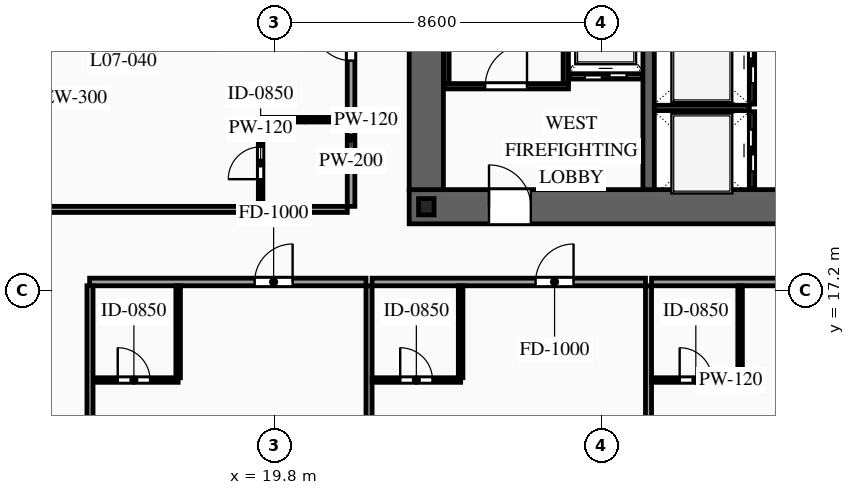
"""IFC4 building model, lengths in metres.
Left out: names, types, materials, properties, quantities, classifications, styles, units other than length and angle.
Written with IfcOpenShell. Run it as: python <this file> out.ifc"""

import sys

from ifc_helpers import new_model, si_unit, direction, frame, frame_2d, origin, origin_2d, place, context, subcontext, project, spatial, rectangle, i_section, extrude, source, transform, mapped, element, fill, save


model = new_model("IFC4")
c1 = context("Model", 3, precision=1e-05, world=origin(), true_north=direction((0.0, 1.0)))
c2 = subcontext(c1, "Body", "Model", "MODEL_VIEW")
j1 = project(units=[si_unit("LENGTHUNIT", "METRE"), si_unit("PLANEANGLEUNIT", "RADIAN")], contexts=[c1])
p1 = place(None, origin())
s1 = spatial("IfcSite", under=j1, at=p1, CompositionType="ELEMENT")
p2 = place(p1, origin())
s2 = spatial("IfcBuilding", under=s1, at=p2, CompositionType="ELEMENT")
p3 = place(p2, frame((0.0, 0.0, 30.6)))
s3 = spatial("IfcBuildingStorey", under=s2, at=p3, CompositionType="ELEMENT", Elevation=30.6)
p4 = place(p3, frame((23.35, 19.4, 0.0), z_axis=(0.0, 0.0, 1.0), x_axis=(1.0, 0.0, 0.0)))
e1 = element("IfcWall", 1, at=p4, inside=s3, PredefinedType="SHEAR", context=c2, shape_type="SweptSolid", body=[
    extrude(rectangle(XDim=27.3, YDim=0.9, at=frame_2d((13.65, 0.0))), origin(), (0.0, 0.0, 1.0), 3.6),
])
p5 = place(p4, frame((2.1, 0.0, 0.0)))
e2 = element("IfcOpeningElement", 2, at=p5, cuts=e1, PredefinedType="OPENING", context=c2, shape_type="SweptSolid", body=[
    extrude(rectangle(XDim=1.1, YDim=2.2, at=frame_2d((0.55, 1.1))), frame((0.0, 0.465, 0.0), z_axis=(0.0, -1.0, 0.0), x_axis=(1.0, 0.0, 0.0)), (0.0, 0.0, 1.0), 0.93),
])
p6 = place(p4, frame((10.0, 0.0, 0.0)))
e3 = element("IfcOpeningElement", 3, at=p6, cuts=e1, PredefinedType="OPENING", context=c2, shape_type="SweptSolid", body=[
    extrude(rectangle(XDim=1.1, YDim=2.2, at=frame_2d((0.55, 1.1))), frame((0.0, 0.465, 0.0), z_axis=(0.0, -1.0, 0.0), x_axis=(1.0, 0.0, 0.0)), (0.0, 0.0, 1.0), 0.93),
])
p7 = place(p4, frame((23.2, 0.0, 0.0)))
e4 = element("IfcOpeningElement", 4, at=p7, cuts=e1, PredefinedType="OPENING", context=c2, shape_type="SweptSolid", body=[
    extrude(rectangle(XDim=1.1, YDim=2.2, at=frame_2d((0.55, 1.1))), frame((0.0, 0.465, 0.0), z_axis=(0.0, -1.0, 0.0), x_axis=(1.0, 0.0, 0.0)), (0.0, 0.0, 1.0), 0.93),
])
p8 = place(p4, frame((19.82, 0.0, 0.0)))
e5 = element("IfcOpeningElement", 5, at=p8, cuts=e1, PredefinedType="OPENING", context=c2, shape_type="SweptSolid", body=[
    extrude(rectangle(XDim=0.9, YDim=2.15, at=frame_2d((0.45, 1.075))), frame((0.0, 0.465, 0.0), z_axis=(0.0, -1.0, 0.0), x_axis=(1.0, 0.0, 0.0)), (0.0, 0.0, 1.0), 0.93),
])
p9 = place(p4, frame((18.38, 0.0, 0.0)))
e6 = element("IfcOpeningElement", 6, at=p9, cuts=e1, PredefinedType="OPENING", context=c2, shape_type="SweptSolid", body=[
    extrude(rectangle(XDim=0.9, YDim=2.15, at=frame_2d((0.45, 1.075))), frame((0.0, 0.465, 0.0), z_axis=(0.0, -1.0, 0.0), x_axis=(1.0, 0.0, 0.0)), (0.0, 0.0, 1.0), 0.93),
])
m1 = source(origin(), c2, "Body", "SweptSolid", [
    extrude(rectangle(XDim=11.9, YDim=0.9, at=frame_2d((5.95, 0.0))), origin(), (0.0, 0.0, 1.0), 3.6),
])
p10 = place(p3, frame((23.8, 19.85, 0.0), z_axis=(0.0, 0.0, 1.0), x_axis=(0.0, 1.0, 0.0)))
e7 = element("IfcWall", 7, at=p10, inside=s3, PredefinedType="SHEAR", context=c2, shape_type="MappedRepresentation", body=[
    mapped(m1, transform((0.0, 0.0, 0.0), scale=1.0)),
])
m2 = source(origin(), c2, "Body", "SweptSolid", [
    extrude(rectangle(XDim=11.9, YDim=0.3, at=frame_2d((5.95, 0.0))), origin(), (0.0, 0.0, 1.0), 3.6),
])
p11 = place(p3, frame((29.65, 19.85, 0.0), z_axis=(0.0, 0.0, 1.0), x_axis=(0.0, 1.0, 0.0)))
e8 = element("IfcWall", 8, at=p11, inside=s3, PredefinedType="SOLIDWALL", context=c2, shape_type="MappedRepresentation", body=[
    mapped(m2, transform((0.0, 0.0, 0.0), scale=1.0)),
])
m3 = source(origin(), c2, "Body", "SweptSolid", [
    extrude(i_section(OverallWidth=0.407, OverallDepth=0.428, WebThickness=0.02, FlangeThickness=0.035, at=origin_2d()), origin(), (0.0, 0.0, 1.0), 3.6),
])
p12 = place(p3, frame((23.8, 19.4, 0.0), z_axis=(0.0, 0.0, 1.0), x_axis=(1.0, 0.0, 0.0)))
e9 = element("IfcColumn", 9, at=p12, inside=s3, PredefinedType="COLUMN", context=c2, shape_type="MappedRepresentation", body=[
    mapped(m3, transform((0.0, 0.0, 0.0), scale=1.0)),
])
p13 = place(p3, frame((27.56, 22.83, 0.0), z_axis=(0.0, 0.0, 1.0), x_axis=(1.0, 0.0, 0.0)))
e10 = element("IfcWall", 10, at=p13, inside=s3, PredefinedType="SOLIDWALL", context=c2, shape_type="SweptSolid", body=[
    extrude(rectangle(XDim=1.92, YDim=0.14, at=frame_2d((0.96, 0.0))), origin(), (0.0, 0.0, 1.0), 3.38),
])
p14 = place(p13, frame((0.41, 0.0, 0.0)))
e11 = element("IfcOpeningElement", 11, at=p14, cuts=e10, PredefinedType="OPENING", context=c2, shape_type="SweptSolid", body=[
    extrude(rectangle(XDim=1.1, YDim=2.2, at=frame_2d((0.55, 1.1))), frame((0.0, 0.085, 0.0), z_axis=(0.0, -1.0, 0.0), x_axis=(1.0, 0.0, 0.0)), (0.0, 0.0, 1.0), 0.17),
])
p15 = place(p3, frame((32.37, 19.86, 0.0), z_axis=(0.0, 0.0, 1.0), x_axis=(0.0, 1.0, 0.0)))
e12 = element("IfcWall", 12, at=p15, inside=s3, PredefinedType="SOLIDWALL", context=c2, shape_type="SweptSolid", body=[
    extrude(rectangle(XDim=2.04, YDim=0.14, at=frame_2d((1.02, 0.0))), origin(), (0.0, 0.0, 1.0), 3.38),
])
p16 = place(p15, frame((0.47, 0.0, 0.0)))
e13 = element("IfcOpeningElement", 13, at=p16, cuts=e12, PredefinedType="OPENING", context=c2, shape_type="SweptSolid", body=[
    extrude(rectangle(XDim=1.1, YDim=2.2, at=frame_2d((0.55, 1.1))), frame((0.0, 0.085, 0.0), z_axis=(0.0, -1.0, 0.0), x_axis=(1.0, 0.0, 0.0)), (0.0, 0.0, 1.0), 0.17),
])
m4 = source(origin(), c2, "Body", "SweptSolid", [
    extrude(rectangle(XDim=2.5, YDim=0.14, at=frame_2d((1.25, 0.0))), origin(), (0.0, 0.0, 1.0), 3.38),
])
p17 = place(p3, frame((29.8, 22.0, 0.0), z_axis=(0.0, 0.0, 1.0), x_axis=(1.0, 0.0, 0.0)))
e14 = element("IfcWall", 14, at=p17, inside=s3, PredefinedType="SOLIDWALL", context=c2, shape_type="MappedRepresentation", body=[
    mapped(m4, transform((0.0, 0.0, 0.0), scale=1.0)),
])
p18 = place(p3, frame((32.37, 22.1, 0.0), z_axis=(0.0, 0.0, 1.0), x_axis=(0.0, 1.0, 0.0)))
e15 = element("IfcWall", 15, at=p18, inside=s3, PredefinedType="SOLIDWALL", context=c2, shape_type="SweptSolid", body=[
    extrude(rectangle(XDim=2.2, YDim=0.14, at=frame_2d((1.1, 0.0))), origin(), (0.0, 0.0, 1.0), 3.38),
])
p19 = place(p18, frame((0.55, 0.0, 0.0)))
e16 = element("IfcOpeningElement", 16, at=p19, cuts=e15, PredefinedType="OPENING", context=c2, shape_type="SweptSolid", body=[
    extrude(rectangle(XDim=1.1, YDim=2.2, at=frame_2d((0.55, 1.1))), frame((0.0, 0.085, 0.0), z_axis=(0.0, -1.0, 0.0), x_axis=(1.0, 0.0, 0.0)), (0.0, 0.0, 1.0), 0.17),
])
p20 = place(p3, frame((24.26, 22.57, 0.0), z_axis=(0.0, 0.0, 1.0), x_axis=(1.0, 0.0, 0.0)))
e17 = element("IfcWall", 17, at=p20, inside=s3, PredefinedType="SOLIDWALL", context=c2, shape_type="SweptSolid", body=[
    extrude(rectangle(XDim=3.28, YDim=0.14, at=frame_2d((1.64, 0.0))), origin(), (0.0, 0.0, 1.0), 3.38),
])
p21 = place(p20, frame((1.09, 0.0, 0.0)))
e18 = element("IfcOpeningElement", 18, at=p21, cuts=e17, PredefinedType="OPENING", context=c2, shape_type="SweptSolid", body=[
    extrude(rectangle(XDim=1.1, YDim=2.2, at=frame_2d((0.55, 1.1))), frame((0.0, 0.085, 0.0), z_axis=(0.0, -1.0, 0.0), x_axis=(1.0, 0.0, 0.0)), (0.0, 0.0, 1.0), 0.17),
])
m5 = source(origin(), c2, "Body", "SweptSolid", [
    extrude(rectangle(XDim=8.94, YDim=0.14, at=frame_2d((4.47, 0.0))), origin(), (0.0, 0.0, 1.0), 3.38),
])
for number, where, z_axis, x_axis in (
    (19, (24.33, 22.64, 0.0), (0.0, 0.0, 1.0), (0.0, 1.0, 0.0)),
    (20, (27.47, 22.64, 0.0), (0.0, 0.0, 1.0), (0.0, 1.0, 0.0)),
):
    element("IfcWall", number, at=place(p3, frame(where, z_axis=z_axis, x_axis=x_axis)), inside=s3, PredefinedType="SOLIDWALL", context=c2, shape_type="MappedRepresentation", body=[
        mapped(m5, transform((0.0, 0.0, 0.0), scale=1.0)),
    ])
p22 = place(p3, frame((14.94, 17.42, 0.0), z_axis=(0.0, 0.0, 1.0), x_axis=(1.0, 0.0, 0.0)))
e21 = element("IfcWall", 21, at=p22, inside=s3, PredefinedType="PARTITIONING", context=c2, shape_type="SweptSolid", body=[
    extrude(rectangle(XDim=7.273, YDim=0.2, at=frame_2d((3.636, 0.0))), origin(), (0.0, 0.0, 1.0), 3.38),
])
p23 = place(p22, frame((4.342, 0.0, 0.0)))
e22 = element("IfcOpeningElement", 22, at=p23, cuts=e21, PredefinedType="OPENING", context=c2, shape_type="SweptSolid", body=[
    extrude(rectangle(XDim=1.0, YDim=2.2, at=frame_2d((0.5, 1.1))), frame((0.0, 0.115, 0.0), z_axis=(0.0, -1.0, 0.0), x_axis=(1.0, 0.0, 0.0)), (0.0, 0.0, 1.0), 0.23),
])
m6 = source(origin(), c2, "Body", "SweptSolid", [
    extrude(rectangle(XDim=16.47, YDim=0.16, at=frame_2d((8.235, 0.0))), origin(), (0.0, 0.0, 1.0), 3.38),
])
p24 = place(p3, frame((22.293, 0.85, 0.0), z_axis=(0.0, 0.0, 1.0), x_axis=(0.0, 1.0, 0.0)))
e23 = element("IfcWall", 23, at=p24, inside=s3, PredefinedType="PARTITIONING", context=c2, shape_type="MappedRepresentation", body=[
    mapped(m6, transform((0.0, 0.0, 0.0), scale=1.0)),
])
p25 = place(p3, frame((14.94, 14.84, 0.0), z_axis=(0.0, 0.0, 1.0), x_axis=(1.0, 0.0, 0.0)))
e24 = element("IfcWall", 24, at=p25, inside=s3, PredefinedType="PARTITIONING", context=c2, shape_type="SweptSolid", body=[
    extrude(rectangle(XDim=2.33, YDim=0.12, at=frame_2d((1.165, 0.0))), origin(), (0.0, 0.0, 1.0), 3.38),
])
p26 = place(p25, frame((0.74, 0.0, 0.0)))
e25 = element("IfcOpeningElement", 25, at=p26, cuts=e24, PredefinedType="OPENING", context=c2, shape_type="SweptSolid", body=[
    extrude(rectangle(XDim=0.85, YDim=2.1, at=frame_2d((0.425, 1.05))), frame((0.0, 0.075, 0.0), z_axis=(0.0, -1.0, 0.0), x_axis=(1.0, 0.0, 0.0)), (0.0, 0.0, 1.0), 0.15),
])
m7 = source(origin(), c2, "Body", "SweptSolid", [
    extrude(rectangle(XDim=2.42, YDim=0.12, at=frame_2d((1.21, 0.0))), origin(), (0.0, 0.0, 1.0), 3.38),
])
p27 = place(p3, frame((17.27, 14.9, 0.0), z_axis=(0.0, 0.0, 1.0), x_axis=(0.0, 1.0, 0.0)))
e26 = element("IfcWall", 26, at=p27, inside=s3, PredefinedType="PARTITIONING", context=c2, shape_type="MappedRepresentation", body=[
    mapped(m7, transform((0.0, 0.0, 0.0), scale=1.0)),
])
p28 = place(p3, frame((22.373, 17.42, 0.0), z_axis=(0.0, 0.0, 1.0), x_axis=(1.0, 0.0, 0.0)))
e27 = element("IfcWall", 27, at=p28, inside=s3, PredefinedType="PARTITIONING", context=c2, shape_type="SweptSolid", body=[
    extrude(rectangle(XDim=7.194, YDim=0.2, at=frame_2d((3.597, 0.0))), origin(), (0.0, 0.0, 1.0), 3.38),
])
p29 = place(p28, frame((4.302, 0.0, 0.0)))
e28 = element("IfcOpeningElement", 28, at=p29, cuts=e27, PredefinedType="OPENING", context=c2, shape_type="SweptSolid", body=[
    extrude(rectangle(XDim=1.0, YDim=2.2, at=frame_2d((0.5, 1.1))), frame((0.0, 0.115, 0.0), z_axis=(0.0, -1.0, 0.0), x_axis=(1.0, 0.0, 0.0)), (0.0, 0.0, 1.0), 0.23),
])
p30 = place(p3, frame((29.647, 0.85, 0.0), z_axis=(0.0, 0.0, 1.0), x_axis=(0.0, 1.0, 0.0)))
e29 = element("IfcWall", 29, at=p30, inside=s3, PredefinedType="PARTITIONING", context=c2, shape_type="MappedRepresentation", body=[
    mapped(m6, transform((0.0, 0.0, 0.0), scale=1.0)),
])
p31 = place(p3, frame((22.373, 14.84, 0.0), z_axis=(0.0, 0.0, 1.0), x_axis=(1.0, 0.0, 0.0)))
e30 = element("IfcWall", 30, at=p31, inside=s3, PredefinedType="PARTITIONING", context=c2, shape_type="SweptSolid", body=[
    extrude(rectangle(XDim=2.33, YDim=0.12, at=frame_2d((1.165, 0.0))), origin(), (0.0, 0.0, 1.0), 3.38),
])
p32 = place(p31, frame((0.74, 0.0, 0.0)))
e31 = element("IfcOpeningElement", 31, at=p32, cuts=e30, PredefinedType="OPENING", context=c2, shape_type="SweptSolid", body=[
    extrude(rectangle(XDim=0.85, YDim=2.1, at=frame_2d((0.425, 1.05))), frame((0.0, 0.075, 0.0), z_axis=(0.0, -1.0, 0.0), x_axis=(1.0, 0.0, 0.0)), (0.0, 0.0, 1.0), 0.15),
])
p33 = place(p3, frame((24.703, 14.9, 0.0), z_axis=(0.0, 0.0, 1.0), x_axis=(0.0, 1.0, 0.0)))
e32 = element("IfcWall", 32, at=p33, inside=s3, PredefinedType="PARTITIONING", context=c2, shape_type="MappedRepresentation", body=[
    mapped(m7, transform((0.0, 0.0, 0.0), scale=1.0)),
])
p34 = place(p3, frame((29.727, 17.42, 0.0), z_axis=(0.0, 0.0, 1.0), x_axis=(1.0, 0.0, 0.0)))
e33 = element("IfcWall", 33, at=p34, inside=s3, PredefinedType="PARTITIONING", context=c2, shape_type="SweptSolid", body=[
    extrude(rectangle(XDim=7.193, YDim=0.2, at=frame_2d((3.596, 0.0))), origin(), (0.0, 0.0, 1.0), 3.38),
])
p35 = place(p34, frame((4.302, 0.0, 0.0)))
e34 = element("IfcOpeningElement", 34, at=p35, cuts=e33, PredefinedType="OPENING", context=c2, shape_type="SweptSolid", body=[
    extrude(rectangle(XDim=1.0, YDim=2.2, at=frame_2d((0.5, 1.1))), frame((0.0, 0.115, 0.0), z_axis=(0.0, -1.0, 0.0), x_axis=(1.0, 0.0, 0.0)), (0.0, 0.0, 1.0), 0.23),
])
p36 = place(p3, frame((29.727, 14.84, 0.0), z_axis=(0.0, 0.0, 1.0), x_axis=(1.0, 0.0, 0.0)))
e35 = element("IfcWall", 35, at=p36, inside=s3, PredefinedType="PARTITIONING", context=c2, shape_type="SweptSolid", body=[
    extrude(rectangle(XDim=2.33, YDim=0.12, at=frame_2d((1.165, 0.0))), origin(), (0.0, 0.0, 1.0), 3.38),
])
p37 = place(p36, frame((0.74, 0.0, 0.0)))
e36 = element("IfcOpeningElement", 36, at=p37, cuts=e35, PredefinedType="OPENING", context=c2, shape_type="SweptSolid", body=[
    extrude(rectangle(XDim=0.85, YDim=2.1, at=frame_2d((0.425, 1.05))), frame((0.0, 0.075, 0.0), z_axis=(0.0, -1.0, 0.0), x_axis=(1.0, 0.0, 0.0)), (0.0, 0.0, 1.0), 0.15),
])
p38 = place(p3, frame((32.057, 14.9, 0.0), z_axis=(0.0, 0.0, 1.0), x_axis=(0.0, 1.0, 0.0)))
e37 = element("IfcWall", 37, at=p38, inside=s3, PredefinedType="PARTITIONING", context=c2, shape_type="MappedRepresentation", body=[
    mapped(m7, transform((0.0, 0.0, 0.0), scale=1.0)),
])
m8 = source(origin(), c2, "Body", "SweptSolid", [
    extrude(rectangle(XDim=16.32, YDim=0.16, at=frame_2d((8.16, 0.0))), origin(), (0.0, 0.0, 1.0), 3.38),
])
p39 = place(p3, frame((14.95, 1.0, 0.0), z_axis=(0.0, 0.0, 1.0), x_axis=(0.0, 1.0, 0.0)))
e38 = element("IfcWall", 38, at=p39, inside=s3, PredefinedType="PARTITIONING", context=c2, shape_type="MappedRepresentation", body=[
    mapped(m8, transform((0.0, 0.0, 0.0), scale=1.0)),
])
p40 = place(p3, frame((21.82, 19.41, 0.0), z_axis=(0.0, 0.0, 1.0), x_axis=(0.0, 1.0, 0.0)))
e39 = element("IfcWall", 39, at=p40, inside=s3, PredefinedType="PARTITIONING", context=c2, shape_type="SweptSolid", body=[
    extrude(rectangle(XDim=6.31, YDim=0.2, at=frame_2d((3.155, 0.0))), origin(), (0.0, 0.0, 1.0), 3.38),
])
p41 = place(p40, frame((3.835, 0.0, 0.0)))
e40 = element("IfcOpeningElement", 40, at=p41, cuts=e39, PredefinedType="OPENING", context=c2, shape_type="SweptSolid", body=[
    extrude(rectangle(XDim=1.0, YDim=2.2, at=frame_2d((0.5, 1.1))), frame((0.0, 0.115, 0.0), z_axis=(0.0, -1.0, 0.0), x_axis=(1.0, 0.0, 0.0)), (0.0, 0.0, 1.0), 0.23),
])
m9 = source(origin(), c2, "Body", "SweptSolid", [
    extrude(rectangle(XDim=9.67, YDim=0.16, at=frame_2d((4.835, 0.0))), origin(), (0.0, 0.0, 1.0), 2.875),
])
p42 = place(p3, frame((12.05, 19.33, 0.0), z_axis=(0.0, 0.0, 1.0), x_axis=(1.0, 0.0, 0.0)))
e41 = element("IfcWall", 41, at=p42, inside=s3, PredefinedType="PARTITIONING", context=c2, shape_type="MappedRepresentation", body=[
    mapped(m9, transform((0.0, 0.0, 0.0), scale=1.0)),
])
p43 = place(p3, frame((19.44, 19.41, 0.0), z_axis=(0.0, 0.0, 1.0), x_axis=(0.0, 1.0, 0.0)))
e42 = element("IfcWall", 42, at=p43, inside=s3, PredefinedType="PARTITIONING", context=c2, shape_type="SweptSolid", body=[
    extrude(rectangle(XDim=2.28, YDim=0.12, at=frame_2d((1.14, 0.0))), origin(), (0.0, 0.0, 1.0), 3.38),
])
p44 = place(p43, frame((0.715, 0.0, 0.0)))
e43 = element("IfcOpeningElement", 43, at=p44, cuts=e42, PredefinedType="OPENING", context=c2, shape_type="SweptSolid", body=[
    extrude(rectangle(XDim=0.85, YDim=2.1, at=frame_2d((0.425, 1.05))), frame((0.0, 0.075, 0.0), z_axis=(0.0, -1.0, 0.0), x_axis=(1.0, 0.0, 0.0)), (0.0, 0.0, 1.0), 0.15),
])
m10 = source(origin(), c2, "Body", "SweptSolid", [
    extrude(rectangle(XDim=2.22, YDim=0.12, at=frame_2d((1.11, 0.0))), origin(), (0.0, 0.0, 1.0), 3.38),
])
p45 = place(p3, frame((19.5, 21.69, 0.0), z_axis=(0.0, 0.0, 1.0), x_axis=(1.0, 0.0, 0.0)))
e44 = element("IfcWall", 44, at=p45, inside=s3, PredefinedType="PARTITIONING", context=c2, shape_type="MappedRepresentation", body=[
    mapped(m10, transform((0.0, 0.0, 0.0), scale=1.0)),
])
m11 = source(origin(), c2, "Body", "SweptSolid", [
    extrude(rectangle(XDim=1.1, YDim=2.2, at=frame_2d((0.55, 1.1))), frame((0.0, 0.025, 0.0), z_axis=(0.0, -1.0, 0.0), x_axis=(1.0, 0.0, 0.0)), (0.0, 0.0, 1.0), 0.05),
])
p46 = place(p14, origin())
e45 = element("IfcDoor", 45, at=p46, inside=s3, OperationType="SLIDING_TO_LEFT", PredefinedType="DOOR", context=c2, shape_type="MappedRepresentation", body=[
    mapped(m11, transform((0.0, 0.0, 0.0), scale=1.0)),
])
fill(e11, e45)
p47 = place(p16, origin())
e46 = element("IfcDoor", 46, at=p47, inside=s3, OperationType="SLIDING_TO_LEFT", PredefinedType="DOOR", context=c2, shape_type="MappedRepresentation", body=[
    mapped(m11, transform((0.0, 0.0, 0.0), scale=1.0)),
])
fill(e13, e46)
p48 = place(p19, origin())
e47 = element("IfcDoor", 47, at=p48, inside=s3, OperationType="SLIDING_TO_RIGHT", PredefinedType="DOOR", context=c2, shape_type="MappedRepresentation", body=[
    mapped(m11, transform((0.0, 0.0, 0.0), scale=1.0)),
])
fill(e16, e47)
m12 = source(origin(), c2, "Body", "SweptSolid", [
    extrude(rectangle(XDim=1.1, YDim=2.2, at=frame_2d((0.55, 1.1))), frame((0.0, 0.025, 0.0), z_axis=(0.0, -1.0, 0.0), x_axis=(1.0, 0.0, 0.0)), (0.0, 0.0, 1.0), 0.05),
])
p49 = place(p21, origin())
e48 = element("IfcDoor", 48, at=p49, inside=s3, OperationType="SINGLE_SWING_RIGHT", PredefinedType="DOOR", context=c2, shape_type="MappedRepresentation", body=[
    mapped(m12, transform((0.0, 0.0, 0.0), scale=1.0)),
])
fill(e18, e48)
p50 = place(p5, origin())
e49 = element("IfcDoor", 49, at=p50, inside=s3, OperationType="SINGLE_SWING_LEFT", PredefinedType="DOOR", context=c2, shape_type="MappedRepresentation", body=[
    mapped(m12, transform((0.0, 0.0, 0.0), scale=1.0)),
])
fill(e2, e49)
m13 = source(origin(), c2, "Body", "SweptSolid", [
    extrude(rectangle(XDim=1.0, YDim=2.2, at=frame_2d((0.5, 1.1))), frame((0.0, 0.025, 0.0), z_axis=(0.0, -1.0, 0.0), x_axis=(1.0, 0.0, 0.0)), (0.0, 0.0, 1.0), 0.05),
])
p51 = place(p23, origin())
e50 = element("IfcDoor", 50, at=p51, inside=s3, OperationType="SINGLE_SWING_RIGHT", PredefinedType="DOOR", context=c2, shape_type="MappedRepresentation", body=[
    mapped(m13, transform((0.0, 0.0, 0.0), scale=1.0)),
])
fill(e22, e50)
m14 = source(origin(), c2, "Body", "SweptSolid", [
    extrude(rectangle(XDim=0.85, YDim=2.1, at=frame_2d((0.425, 1.05))), frame((0.0, 0.025, 0.0), z_axis=(0.0, -1.0, 0.0), x_axis=(1.0, 0.0, 0.0)), (0.0, 0.0, 1.0), 0.05),
])
p52 = place(p26, origin())
e51 = element("IfcDoor", 51, at=p52, inside=s3, OperationType="SINGLE_SWING_LEFT", PredefinedType="DOOR", context=c2, shape_type="MappedRepresentation", body=[
    mapped(m14, transform((0.0, 0.0, 0.0), scale=1.0)),
])
fill(e25, e51)
p53 = place(p29, origin())
e52 = element("IfcDoor", 52, at=p53, inside=s3, OperationType="SINGLE_SWING_RIGHT", PredefinedType="DOOR", context=c2, shape_type="MappedRepresentation", body=[
    mapped(m13, transform((0.0, 0.0, 0.0), scale=1.0)),
])
fill(e28, e52)
p54 = place(p32, origin())
e53 = element("IfcDoor", 53, at=p54, inside=s3, OperationType="SINGLE_SWING_LEFT", PredefinedType="DOOR", context=c2, shape_type="MappedRepresentation", body=[
    mapped(m14, transform((0.0, 0.0, 0.0), scale=1.0)),
])
fill(e31, e53)
p55 = place(p37, origin())
e54 = element("IfcDoor", 54, at=p55, inside=s3, OperationType="SINGLE_SWING_LEFT", PredefinedType="DOOR", context=c2, shape_type="MappedRepresentation", body=[
    mapped(m14, transform((0.0, 0.0, 0.0), scale=1.0)),
])
fill(e36, e54)
p56 = place(p41, origin())
e55 = element("IfcDoor", 55, at=p56, inside=s3, OperationType="SINGLE_SWING_RIGHT", PredefinedType="DOOR", context=c2, shape_type="MappedRepresentation", body=[
    mapped(m13, transform((0.0, 0.0, 0.0), scale=1.0)),
])
fill(e40, e55)
p57 = place(p44, origin())
e56 = element("IfcDoor", 56, at=p57, inside=s3, OperationType="SINGLE_SWING_LEFT", PredefinedType="DOOR", context=c2, shape_type="MappedRepresentation", body=[
    mapped(m14, transform((0.0, 0.0, 0.0), scale=1.0)),
])
fill(e43, e56)
save(model, sys.argv[1])
